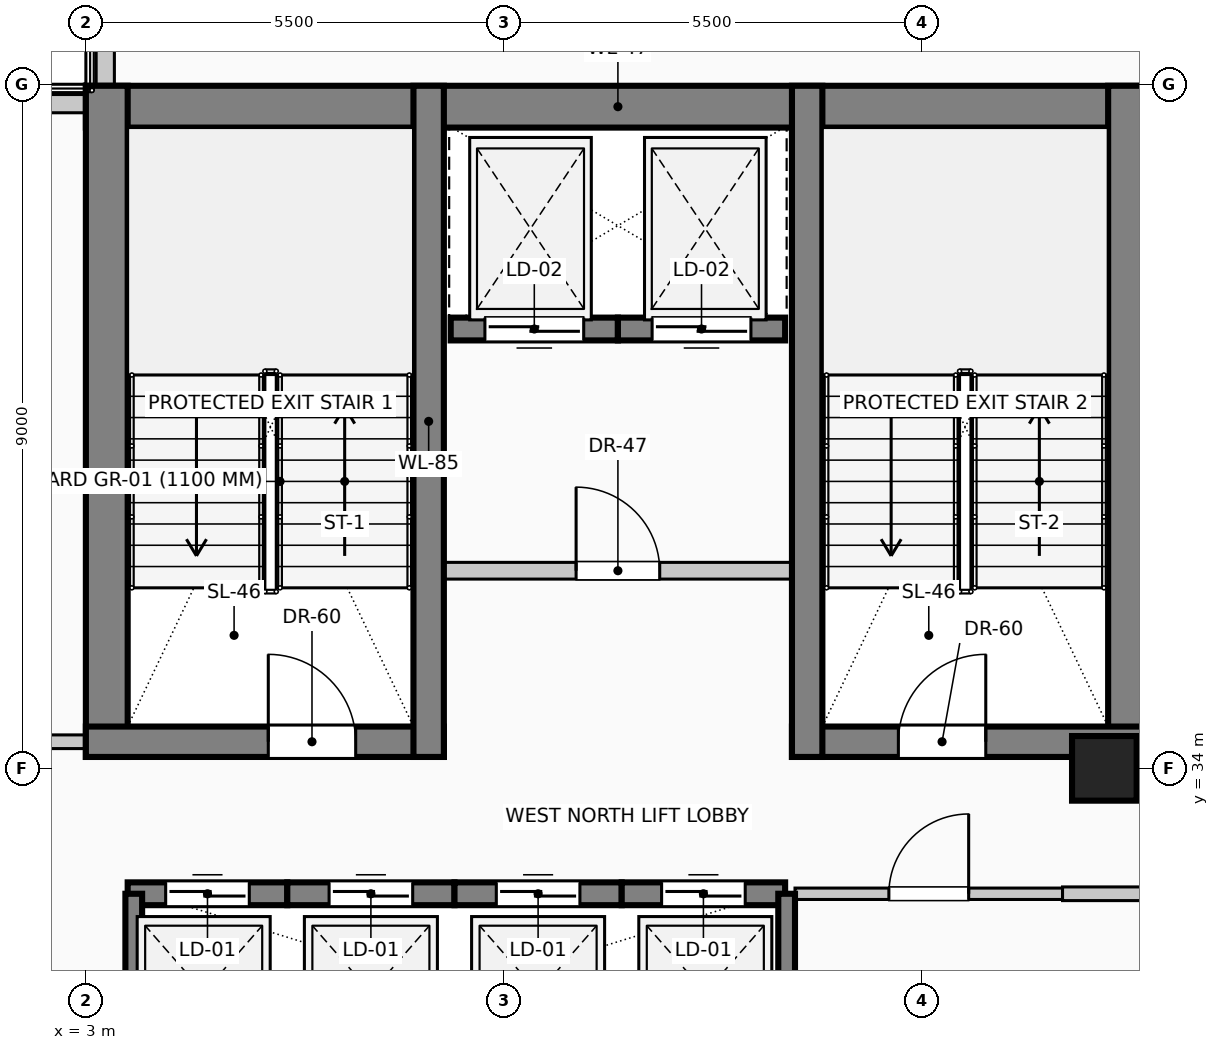
"""IFC4 building model, lengths in metres.
Left out: names, types, materials, properties, quantities, classifications, styles, units other than length and angle.
Written with IfcOpenShell. Run it as: python <this file> out.ifc"""

import sys

from ifc_helpers import new_model, si_unit, direction, frame, frame_2d, origin, origin_2d, place, context, subcontext, project, spatial, rectangle, circle, extrude, element, fill, save


model = new_model("IFC4")
c1 = context("Model", 3, precision=1e-05, world=origin(), true_north=direction((0.0, 1.0)))
c2 = subcontext(c1, "Body", "Model", "MODEL_VIEW")
j1 = project(units=[si_unit("LENGTHUNIT", "METRE"), si_unit("PLANEANGLEUNIT", "RADIAN")], contexts=[c1])
p1 = place(None, origin())
s1 = spatial("IfcSite", under=j1, at=p1, CompositionType="ELEMENT")
p2 = place(p1, origin())
s2 = spatial("IfcBuilding", under=s1, at=p2, CompositionType="ELEMENT")
p3 = place(p2, frame((0.0, 0.0, 297.0)))
s3 = spatial("IfcBuildingStorey", under=s2, at=p3, CompositionType="ELEMENT", Elevation=297.0)
p4 = place(p3, frame((3.0, 42.705, 0.0), z_axis=(0.0, 0.0, 1.0), x_axis=(1.0, 0.0, 0.0)))
e1 = element("IfcWall", 1, at=p4, inside=s3, PredefinedType="SHEAR", context=c2, shape_type="SweptSolid", body=[
    extrude(rectangle(XDim=14.0, YDim=0.55, at=frame_2d((7.0, 0.0))), origin(), (0.0, 0.0, 1.0), 4.0),
])
for number, where, z_axis, x_axis in (
    (2, (3.275, 34.15, 0.0), (0.0, 0.0, 1.0), (0.0, 1.0, 0.0)),
    (3, (16.725, 34.15, 0.0), (0.0, 0.0, 1.0), (0.0, 1.0, 0.0)),
):
    element("IfcWall", number, at=place(p3, frame(where, z_axis=z_axis, x_axis=x_axis)), inside=s3, PredefinedType="SHEAR", context=c2, shape_type="SweptSolid", body=[
        extrude(rectangle(XDim=8.83, YDim=0.55, at=frame_2d((4.415, 0.0))), origin(), (0.0, 0.0, 1.0), 4.0),
    ])
p5 = place(p3, frame((3.0, 34.35, 0.0), z_axis=(0.0, 0.0, 1.0), x_axis=(1.0, 0.0, 0.0)))
e4 = element("IfcWall", 4, at=p5, inside=s3, PredefinedType="SHEAR", context=c2, shape_type="SweptSolid", body=[
    extrude(rectangle(XDim=4.71, YDim=0.4, at=frame_2d((2.355, 0.0))), origin(), (0.0, 0.0, 1.0), 4.0),
])
p6 = place(p5, frame((2.4, 0.0, 0.0)))
e5 = element("IfcOpeningElement", 5, at=p6, cuts=e4, PredefinedType="OPENING", context=c2, shape_type="SweptSolid", body=[
    extrude(rectangle(XDim=1.15, YDim=2.2, at=frame_2d((0.575, 1.1))), frame((0.0, 0.21, 0.0), z_axis=(0.0, -1.0, 0.0), x_axis=(1.0, 0.0, 0.0)), (0.0, 0.0, 1.0), 0.42),
])
p7 = place(p3, frame((12.29, 34.35, 0.0), z_axis=(0.0, 0.0, 1.0), x_axis=(1.0, 0.0, 0.0)))
e6 = element("IfcWall", 6, at=p7, inside=s3, PredefinedType="SHEAR", context=c2, shape_type="SweptSolid", body=[
    extrude(rectangle(XDim=4.71, YDim=0.4, at=frame_2d((2.355, 0.0))), origin(), (0.0, 0.0, 1.0), 4.0),
])
p8 = place(p7, frame((1.4, 0.0, 0.0)))
e7 = element("IfcOpeningElement", 7, at=p8, cuts=e6, PredefinedType="OPENING", context=c2, shape_type="SweptSolid", body=[
    extrude(rectangle(XDim=1.15, YDim=2.2, at=frame_2d((0.575, 1.1))), frame((0.0, 0.21, 0.0), z_axis=(0.0, -1.0, 0.0), x_axis=(1.0, 0.0, 0.0)), (0.0, 0.0, 1.0), 0.42),
])
for number, where, z_axis, x_axis in (
    (8, (7.51, 34.15, 0.0), (0.0, 0.0, 1.0), (0.0, 1.0, 0.0)),
    (9, (12.49, 34.15, 0.0), (0.0, 0.0, 1.0), (0.0, 1.0, 0.0)),
):
    element("IfcWall", number, at=place(p3, frame(where, z_axis=z_axis, x_axis=x_axis)), inside=s3, PredefinedType="SHEAR", context=c2, shape_type="SweptSolid", body=[
        extrude(rectangle(XDim=8.83, YDim=0.4, at=frame_2d((4.415, 0.0))), origin(), (0.0, 0.0, 1.0), 4.0),
    ])
p9 = place(p3, frame((16.4, 34.0, 0.0), z_axis=(0.0, 0.0, 1.0), x_axis=(1.0, 0.0, 0.0)))
e10 = element("IfcColumn", 10, at=p9, inside=s3, PredefinedType="COLUMN", context=c2, shape_type="SweptSolid", body=[
    extrude(circle(Radius=0.425, at=origin_2d()), origin(), (0.0, 0.0, 1.0), 4.0),
])
p10 = place(p3, frame((0.6, 42.745, 0.0), z_axis=(0.0, 0.0, 1.0), x_axis=(1.0, 0.0, 0.0)))
e11 = element("IfcWall", 11, at=p10, inside=s3, PredefinedType="SOLIDWALL", context=c2, shape_type="SweptSolid", body=[
    extrude(rectangle(XDim=2.395, YDim=0.24, at=frame_2d((1.198, 0.0))), origin(), (0.0, 0.0, 1.0), 3.775),
])
p11 = place(p3, frame((3.255, 42.985, 0.0), z_axis=(0.0, 0.0, 1.0), x_axis=(0.0, 1.0, 0.0)))
e12 = element("IfcWall", 12, at=p11, inside=s3, PredefinedType="SOLIDWALL", context=c2, shape_type="SweptSolid", body=[
    extrude(rectangle(XDim=2.415, YDim=0.24, at=frame_2d((1.208, 0.0))), origin(), (0.0, 0.0, 1.0), 3.775),
])
p12 = place(p3, frame((3.55, 32.35, 0.0), z_axis=(0.0, 0.0, 1.0), x_axis=(1.0, 0.0, 0.0)))
e13 = element("IfcWall", 13, at=p12, inside=s3, PredefinedType="SOLIDWALL", context=c2, shape_type="SweptSolid", body=[
    extrude(rectangle(XDim=2.1, YDim=0.3, at=frame_2d((1.05, 0.0))), origin(), (0.0, 0.0, 1.0), 4.0),
])
p13 = place(p12, frame((0.5, 0.0, 0.0)))
e14 = element("IfcOpeningElement", 14, at=p13, cuts=e13, PredefinedType="OPENING", context=c2, shape_type="SweptSolid", body=[
    extrude(rectangle(XDim=1.1, YDim=2.2, at=frame_2d((0.55, 1.1))), frame((0.0, 0.16, 0.0), z_axis=(0.0, -1.0, 0.0), x_axis=(1.0, 0.0, 0.0)), (0.0, 0.0, 1.0), 0.32),
])
p14 = place(p3, frame((5.65, 32.35, 0.0), z_axis=(0.0, 0.0, 1.0), x_axis=(1.0, 0.0, 0.0)))
e15 = element("IfcWall", 15, at=p14, inside=s3, PredefinedType="SOLIDWALL", context=c2, shape_type="SweptSolid", body=[
    extrude(rectangle(XDim=2.2, YDim=0.3, at=frame_2d((1.1, 0.0))), origin(), (0.0, 0.0, 1.0), 4.0),
])
p15 = place(p14, frame((0.55, 0.0, 0.0)))
e16 = element("IfcOpeningElement", 16, at=p15, cuts=e15, PredefinedType="OPENING", context=c2, shape_type="SweptSolid", body=[
    extrude(rectangle(XDim=1.1, YDim=2.2, at=frame_2d((0.55, 1.1))), frame((0.0, 0.16, 0.0), z_axis=(0.0, -1.0, 0.0), x_axis=(1.0, 0.0, 0.0)), (0.0, 0.0, 1.0), 0.32),
])
p16 = place(p3, frame((7.85, 32.35, 0.0), z_axis=(0.0, 0.0, 1.0), x_axis=(1.0, 0.0, 0.0)))
e17 = element("IfcWall", 17, at=p16, inside=s3, PredefinedType="SOLIDWALL", context=c2, shape_type="SweptSolid", body=[
    extrude(rectangle(XDim=2.2, YDim=0.3, at=frame_2d((1.1, 0.0))), origin(), (0.0, 0.0, 1.0), 4.0),
])
p17 = place(p16, frame((0.55, 0.0, 0.0)))
e18 = element("IfcOpeningElement", 18, at=p17, cuts=e17, PredefinedType="OPENING", context=c2, shape_type="SweptSolid", body=[
    extrude(rectangle(XDim=1.1, YDim=2.2, at=frame_2d((0.55, 1.1))), frame((0.0, 0.16, 0.0), z_axis=(0.0, -1.0, 0.0), x_axis=(1.0, 0.0, 0.0)), (0.0, 0.0, 1.0), 0.32),
])
p18 = place(p3, frame((10.05, 32.35, 0.0), z_axis=(0.0, 0.0, 1.0), x_axis=(1.0, 0.0, 0.0)))
e19 = element("IfcWall", 19, at=p18, inside=s3, PredefinedType="SOLIDWALL", context=c2, shape_type="SweptSolid", body=[
    extrude(rectangle(XDim=2.15, YDim=0.3, at=frame_2d((1.075, 0.0))), origin(), (0.0, 0.0, 1.0), 4.0),
])
p19 = place(p18, frame((0.525, 0.0, 0.0)))
e20 = element("IfcOpeningElement", 20, at=p19, cuts=e19, PredefinedType="OPENING", context=c2, shape_type="SweptSolid", body=[
    extrude(rectangle(XDim=1.1, YDim=2.2, at=frame_2d((0.55, 1.1))), frame((0.0, 0.16, 0.0), z_axis=(0.0, -1.0, 0.0), x_axis=(1.0, 0.0, 0.0)), (0.0, 0.0, 1.0), 0.32),
])
p20 = place(p3, frame((10.0, 39.78, 0.0), z_axis=(0.0, 0.0, 1.0), x_axis=(-1.0, 0.0, 0.0)))
e21 = element("IfcWall", 21, at=p20, inside=s3, PredefinedType="SOLIDWALL", context=c2, shape_type="SweptSolid", body=[
    extrude(rectangle(XDim=2.2, YDim=0.3, at=frame_2d((1.1, 0.0))), origin(), (0.0, 0.0, 1.0), 4.0),
])
p21 = place(p20, frame((0.45, 0.0, 0.0)))
e22 = element("IfcOpeningElement", 22, at=p21, cuts=e21, PredefinedType="OPENING", context=c2, shape_type="SweptSolid", body=[
    extrude(rectangle(XDim=1.3, YDim=2.25, at=frame_2d((0.65, 1.125))), frame((0.0, 0.16, 0.0), z_axis=(0.0, -1.0, 0.0), x_axis=(1.0, 0.0, 0.0)), (0.0, 0.0, 1.0), 0.32),
])
p22 = place(p3, frame((12.2, 39.78, 0.0), z_axis=(0.0, 0.0, 1.0), x_axis=(-1.0, 0.0, 0.0)))
e23 = element("IfcWall", 23, at=p22, inside=s3, PredefinedType="SOLIDWALL", context=c2, shape_type="SweptSolid", body=[
    extrude(rectangle(XDim=2.2, YDim=0.3, at=frame_2d((1.1, 0.0))), origin(), (0.0, 0.0, 1.0), 4.0),
])
p23 = place(p22, frame((0.45, 0.0, 0.0)))
e24 = element("IfcOpeningElement", 24, at=p23, cuts=e23, PredefinedType="OPENING", context=c2, shape_type="SweptSolid", body=[
    extrude(rectangle(XDim=1.3, YDim=2.25, at=frame_2d((0.65, 1.125))), frame((0.0, 0.16, 0.0), z_axis=(0.0, -1.0, 0.0), x_axis=(1.0, 0.0, 0.0)), (0.0, 0.0, 1.0), 0.32),
])
p24 = place(p3, frame((3.63, 26.8, 0.0), z_axis=(0.0, 0.0, 1.0), x_axis=(0.0, 1.0, 0.0)))
e25 = element("IfcWall", 25, at=p24, inside=s3, PredefinedType="SOLIDWALL", context=c2, shape_type="SweptSolid", body=[
    extrude(rectangle(XDim=5.55, YDim=0.22, at=frame_2d((2.775, 0.0))), origin(), (0.0, 0.0, 1.0), 4.0),
])
p25 = place(p3, frame((12.22, 29.75, 0.0), z_axis=(0.0, 0.0, 1.0), x_axis=(0.0, 1.0, 0.0)))
e26 = element("IfcWall", 26, at=p25, inside=s3, PredefinedType="SOLIDWALL", context=c2, shape_type="SweptSolid", body=[
    extrude(rectangle(XDim=2.6, YDim=0.22, at=frame_2d((1.3, 0.0))), origin(), (0.0, 0.0, 1.0), 4.0),
])
p26 = place(p3, frame((7.51, 36.6, 0.0), z_axis=(0.0, 0.0, 1.0), x_axis=(1.0, 0.0, 0.0)))
e27 = element("IfcWall", 27, at=p26, inside=s3, PredefinedType="PARTITIONING", context=c2, shape_type="SweptSolid", body=[
    extrude(rectangle(XDim=4.98, YDim=0.22, at=frame_2d((2.49, 0.0))), origin(), (0.0, 0.0, 1.0), 3.775),
])
p27 = place(p26, frame((1.94, 0.0, 0.0)))
e28 = element("IfcOpeningElement", 28, at=p27, cuts=e27, PredefinedType="OPENING", context=c2, shape_type="SweptSolid", body=[
    extrude(rectangle(XDim=1.1, YDim=2.2, at=frame_2d((0.55, 1.1))), frame((0.0, 0.12, 0.0), z_axis=(0.0, -1.0, 0.0), x_axis=(1.0, 0.0, 0.0)), (0.0, 0.0, 1.0), 0.24),
])
p28 = place(p3, frame((12.33, 32.35, 0.0), z_axis=(0.0, 0.0, 1.0), x_axis=(1.0, 0.0, 0.0)))
e29 = element("IfcWall", 29, at=p28, inside=s3, PredefinedType="PARTITIONING", context=c2, shape_type="SweptSolid", body=[
    extrude(rectangle(XDim=3.52, YDim=0.15, at=frame_2d((1.76, 0.0))), origin(), (0.0, 0.0, 1.0), 3.775),
])
p29 = place(p28, frame((1.235, 0.0, 0.0)))
e30 = element("IfcOpeningElement", 30, at=p29, cuts=e29, PredefinedType="OPENING", context=c2, shape_type="SweptSolid", body=[
    extrude(rectangle(XDim=1.05, YDim=2.15, at=frame_2d((0.525, 1.075))), frame((0.0, 0.085, 0.0), z_axis=(0.0, -1.0, 0.0), x_axis=(1.0, 0.0, 0.0)), (0.0, 0.0, 1.0), 0.17),
])
p30 = place(p3, frame((15.85, 32.35, 0.0), z_axis=(0.0, 0.0, 1.0), x_axis=(1.0, 0.0, 0.0)))
e31 = element("IfcWall", 31, at=p30, inside=s3, PredefinedType="PARTITIONING", context=c2, shape_type="SweptSolid", body=[
    extrude(rectangle(XDim=5.15, YDim=0.18, at=frame_2d((2.575, 0.0))), origin(), (0.0, 0.0, 1.0), 3.775),
])
p31 = place(p3, frame((1.05, 34.35, 0.0), z_axis=(0.0, 0.0, 1.0), x_axis=(1.0, 0.0, 0.0)))
e32 = element("IfcWall", 32, at=p31, inside=s3, PredefinedType="PARTITIONING", context=c2, shape_type="SweptSolid", body=[
    extrude(rectangle(XDim=1.95, YDim=0.18, at=frame_2d((0.975, 0.0))), origin(), (0.0, 0.0, 1.0), 3.775),
])
p32 = place(p13, origin())
e33 = element("IfcDoor", 33, at=p32, inside=s3, OperationType="SLIDING_TO_LEFT", PredefinedType="DOOR", context=c2, shape_type="SweptSolid", body=[
    extrude(rectangle(XDim=1.1, YDim=2.2, at=frame_2d((0.55, 1.1))), frame((0.0, 0.025, 0.0), z_axis=(0.0, -1.0, 0.0), x_axis=(1.0, 0.0, 0.0)), (0.0, 0.0, 1.0), 0.05),
])
fill(e14, e33)
p33 = place(p15, origin())
e34 = element("IfcDoor", 34, at=p33, inside=s3, OperationType="SLIDING_TO_RIGHT", PredefinedType="DOOR", context=c2, shape_type="SweptSolid", body=[
    extrude(rectangle(XDim=1.1, YDim=2.2, at=frame_2d((0.55, 1.1))), frame((0.0, 0.025, 0.0), z_axis=(0.0, -1.0, 0.0), x_axis=(1.0, 0.0, 0.0)), (0.0, 0.0, 1.0), 0.05),
])
fill(e16, e34)
p34 = place(p17, origin())
e35 = element("IfcDoor", 35, at=p34, inside=s3, OperationType="SLIDING_TO_LEFT", PredefinedType="DOOR", context=c2, shape_type="SweptSolid", body=[
    extrude(rectangle(XDim=1.1, YDim=2.2, at=frame_2d((0.55, 1.1))), frame((0.0, 0.025, 0.0), z_axis=(0.0, -1.0, 0.0), x_axis=(1.0, 0.0, 0.0)), (0.0, 0.0, 1.0), 0.05),
])
fill(e18, e35)
p35 = place(p19, origin())
e36 = element("IfcDoor", 36, at=p35, inside=s3, OperationType="SLIDING_TO_RIGHT", PredefinedType="DOOR", context=c2, shape_type="SweptSolid", body=[
    extrude(rectangle(XDim=1.1, YDim=2.2, at=frame_2d((0.55, 1.1))), frame((0.0, 0.025, 0.0), z_axis=(0.0, -1.0, 0.0), x_axis=(1.0, 0.0, 0.0)), (0.0, 0.0, 1.0), 0.05),
])
fill(e20, e36)
p36 = place(p21, origin())
e37 = element("IfcDoor", 37, at=p36, inside=s3, OperationType="SLIDING_TO_LEFT", PredefinedType="DOOR", context=c2, shape_type="SweptSolid", body=[
    extrude(rectangle(XDim=1.3, YDim=2.25, at=frame_2d((0.65, 1.125))), frame((0.0, 0.025, 0.0), z_axis=(0.0, -1.0, 0.0), x_axis=(1.0, 0.0, 0.0)), (0.0, 0.0, 1.0), 0.05),
])
fill(e22, e37)
p37 = place(p23, origin())
e38 = element("IfcDoor", 38, at=p37, inside=s3, OperationType="SLIDING_TO_RIGHT", PredefinedType="DOOR", context=c2, shape_type="SweptSolid", body=[
    extrude(rectangle(XDim=1.3, YDim=2.25, at=frame_2d((0.65, 1.125))), frame((0.0, 0.025, 0.0), z_axis=(0.0, -1.0, 0.0), x_axis=(1.0, 0.0, 0.0)), (0.0, 0.0, 1.0), 0.05),
])
fill(e24, e38)
p38 = place(p6, origin())
e39 = element("IfcDoor", 39, at=p38, inside=s3, OperationType="SINGLE_SWING_LEFT", PredefinedType="DOOR", context=c2, shape_type="SweptSolid", body=[
    extrude(rectangle(XDim=1.15, YDim=2.2, at=frame_2d((0.575, 1.1))), frame((0.0, 0.025, 0.0), z_axis=(0.0, -1.0, 0.0), x_axis=(1.0, 0.0, 0.0)), (0.0, 0.0, 1.0), 0.05),
])
fill(e5, e39)
p39 = place(p8, origin())
e40 = element("IfcDoor", 40, at=p39, inside=s3, OperationType="SINGLE_SWING_RIGHT", PredefinedType="DOOR", context=c2, shape_type="SweptSolid", body=[
    extrude(rectangle(XDim=1.15, YDim=2.2, at=frame_2d((0.575, 1.1))), frame((0.0, 0.025, 0.0), z_axis=(0.0, -1.0, 0.0), x_axis=(1.0, 0.0, 0.0)), (0.0, 0.0, 1.0), 0.05),
])
fill(e7, e40)
p40 = place(p27, origin())
e41 = element("IfcDoor", 41, at=p40, inside=s3, OperationType="SINGLE_SWING_LEFT", PredefinedType="DOOR", context=c2, shape_type="SweptSolid", body=[
    extrude(rectangle(XDim=1.1, YDim=2.2, at=frame_2d((0.55, 1.1))), frame((0.0, 0.025, 0.0), z_axis=(0.0, -1.0, 0.0), x_axis=(1.0, 0.0, 0.0)), (0.0, 0.0, 1.0), 0.05),
])
fill(e28, e41)
p41 = place(p29, origin())
e42 = element("IfcDoor", 42, at=p41, inside=s3, OperationType="SINGLE_SWING_RIGHT", PredefinedType="DOOR", context=c2, shape_type="SweptSolid", body=[
    extrude(rectangle(XDim=1.05, YDim=2.15, at=frame_2d((0.525, 1.075))), frame((0.0, 0.025, 0.0), z_axis=(0.0, -1.0, 0.0), x_axis=(1.0, 0.0, 0.0)), (0.0, 0.0, 1.0), 0.05),
])
fill(e30, e42)
save(model, sys.argv[1])
